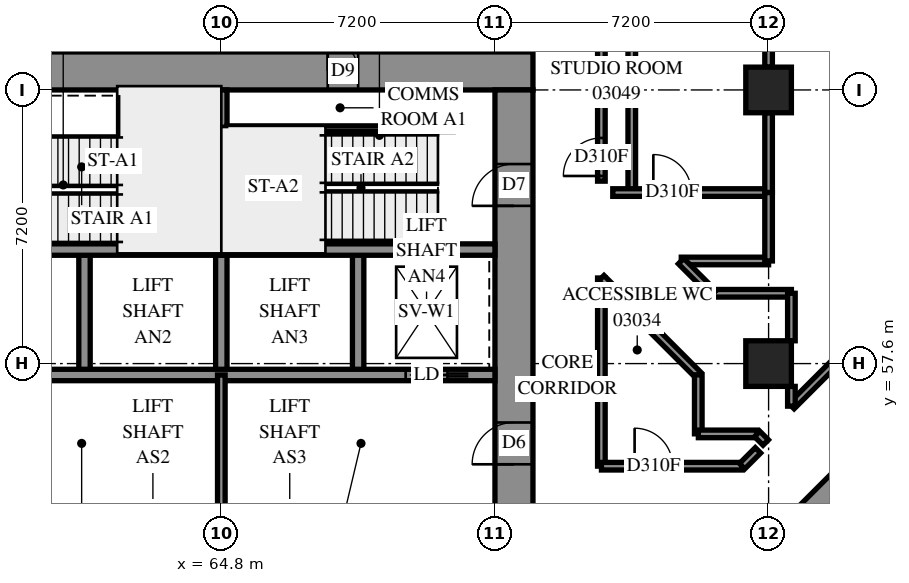
"""IFC4 building model, lengths in metres.
Left out: names, types, materials, properties, quantities, classifications, styles, units other than length and angle.
Written with IfcOpenShell. Run it as: python <this file> out.ifc"""

import sys

from ifc_helpers import new_model, si_unit, direction, frame, frame_2d, origin, origin_2d, place, context, subcontext, project, spatial, polyline, rectangle, outline, extrude, element, fill, save


model = new_model("IFC4")
c1 = context("Model", 3, precision=1e-05, world=origin(), true_north=direction((0.0, 1.0)))
c2 = subcontext(c1, "Body", "Model", "MODEL_VIEW")
j1 = project(units=[si_unit("LENGTHUNIT", "METRE"), si_unit("PLANEANGLEUNIT", "RADIAN")], contexts=[c1])
p1 = place(None, origin())
s1 = spatial("IfcSite", under=j1, at=p1, CompositionType="ELEMENT")
p2 = place(p1, origin())
s2 = spatial("IfcBuilding", under=s1, at=p2, CompositionType="ELEMENT")
p3 = place(p2, frame((0.0, 0.0, 14.4)))
s3 = spatial("IfcBuildingStorey", under=s2, at=p3, CompositionType="ELEMENT", Elevation=14.4)
for number, where, z_axis, x_axis in (
    (1, (79.2, 57.6, 0.0), (0.0, 0.0, 1.0), (1.0, 0.0, 0.0)),
    (2, (79.2, 64.8, 0.0), (0.0, 0.0, 1.0), (1.0, 0.0, 0.0)),
):
    element("IfcColumn", number, at=place(p3, frame(where, z_axis=z_axis, x_axis=x_axis)), inside=s3, PredefinedType="COLUMN", context=c2, shape_type="SweptSolid", body=[
        extrude(rectangle(XDim=1.2, YDim=1.2, at=origin_2d()), origin(), (0.0, 0.0, 1.0), 3.8),
    ])
p4 = place(p3, frame((56.6, 65.3, -0.4), z_axis=(0.0, 0.0, 1.0), x_axis=(1.0, 0.0, 0.0)))
e3 = element("IfcWall", 3, at=p4, inside=s3, PredefinedType="SHEAR", context=c2, shape_type="SweptSolid", body=[
    extrude(rectangle(XDim=16.4, YDim=1.0, at=frame_2d((8.2, 0.0))), origin(), (0.0, 0.0, 1.0), 3.5),
])
p5 = place(p4, frame((11.0, 0.0, 0.4)))
e4 = element("IfcOpeningElement", 4, at=p5, cuts=e3, PredefinedType="OPENING", context=c2, shape_type="SweptSolid", body=[
    extrude(rectangle(XDim=0.8, YDim=2.1, at=frame_2d((0.4, 1.05))), frame((0.0, 0.51, 0.0), z_axis=(0.0, -1.0, 0.0), x_axis=(1.0, 0.0, 0.0)), (0.0, 0.0, 1.0), 1.02),
])
p6 = place(p3, frame((72.5, 50.4, -0.4), z_axis=(0.0, 0.0, 1.0), x_axis=(0.0, 1.0, 0.0)))
e5 = element("IfcWall", 5, at=p6, inside=s3, PredefinedType="SHEAR", context=c2, shape_type="SweptSolid", body=[
    extrude(rectangle(XDim=14.4, YDim=1.0, at=frame_2d((7.2, 0.0))), origin(), (0.0, 0.0, 1.0), 3.5),
])
p7 = place(p6, frame((4.55, 0.0, 0.4)))
e6 = element("IfcOpeningElement", 6, at=p7, cuts=e5, PredefinedType="OPENING", context=c2, shape_type="SweptSolid", body=[
    extrude(rectangle(XDim=1.1, YDim=2.1, at=frame_2d((0.55, 1.05))), frame((0.0, 0.51, 0.0), z_axis=(0.0, -1.0, 0.0), x_axis=(1.0, 0.0, 0.0)), (0.0, 0.0, 1.0), 1.02),
])
p8 = place(p6, frame((11.35, 0.0, 0.4)))
e7 = element("IfcOpeningElement", 7, at=p8, cuts=e5, PredefinedType="OPENING", context=c2, shape_type="SweptSolid", body=[
    extrude(rectangle(XDim=1.1, YDim=2.1, at=frame_2d((0.55, 1.05))), frame((0.0, 0.51, 0.0), z_axis=(0.0, -1.0, 0.0), x_axis=(1.0, 0.0, 0.0)), (0.0, 0.0, 1.0), 1.02),
])
for number, where, z_axis, x_axis in (
    (8, (61.2, 57.3, 0.0), (0.0, 0.0, 1.0), (0.0, 1.0, 0.0)),
    (9, (64.8, 57.3, 0.0), (0.0, 0.0, 1.0), (0.0, 1.0, 0.0)),
    (10, (68.4, 57.3, 0.0), (0.0, 0.0, 1.0), (0.0, 1.0, 0.0)),
):
    element("IfcWall", number, at=place(p3, frame(where, z_axis=z_axis, x_axis=x_axis)), inside=s3, PredefinedType="SOLIDWALL", context=c2, shape_type="SweptSolid", body=[
        extrude(rectangle(XDim=3.3, YDim=0.3, at=frame_2d((1.65, 0.0))), origin(), (0.0, 0.0, 1.0), 3.8),
    ])
p9 = place(p3, frame((57.6, 57.3, 0.0), z_axis=(0.0, 0.0, 1.0), x_axis=(1.0, 0.0, 0.0)))
e11 = element("IfcWall", 11, at=p9, inside=s3, PredefinedType="SOLIDWALL", context=c2, shape_type="SweptSolid", body=[
    extrude(rectangle(XDim=14.4, YDim=0.3, at=frame_2d((7.2, 0.0))), origin(), (0.0, 0.0, 1.0), 3.8),
])
p10 = place(p9, frame((12.05, 0.0, 0.0)))
e12 = element("IfcOpeningElement", 12, at=p10, cuts=e11, PredefinedType="OPENING", context=c2, shape_type="SweptSolid", body=[
    extrude(rectangle(XDim=1.1, YDim=2.1, at=frame_2d((0.55, 1.05))), frame((0.0, 0.16, 0.0), z_axis=(0.0, -1.0, 0.0), x_axis=(1.0, 0.0, 0.0)), (0.0, 0.0, 1.0), 0.32),
])
for number, where, z_axis, x_axis in (
    (13, (57.6, 60.6, 0.0), (0.0, 0.0, 1.0), (1.0, 0.0, 0.0)),
    (14, (64.8, 60.6, 0.0), (0.0, 0.0, 1.0), (1.0, 0.0, 0.0)),
):
    element("IfcWall", number, at=place(p3, frame(where, z_axis=z_axis, x_axis=x_axis)), inside=s3, PredefinedType="SOLIDWALL", context=c2, shape_type="SweptSolid", body=[
        extrude(rectangle(XDim=7.2, YDim=0.3, at=frame_2d((3.6, 0.0))), origin(), (0.0, 0.0, 1.0), 3.8),
    ])
p11 = place(p3, frame((64.8, 60.6, 0.0), z_axis=(0.0, 0.0, 1.0), x_axis=(0.0, 1.0, 0.0)))
e15 = element("IfcWall", 15, at=p11, inside=s3, PredefinedType="SOLIDWALL", context=c2, shape_type="SweptSolid", body=[
    extrude(rectangle(XDim=4.2, YDim=0.3, at=frame_2d((2.1, 0.0))), origin(), (0.0, 0.0, 1.0), 3.8),
])
p12 = place(p3, frame((76.301, 49.443, -0.4), z_axis=(0.0, 0.0, 1.0), x_axis=(0.7071067812, 0.7071067812, 0.0)))
e16 = element("IfcWall", 16, at=p12, inside=s3, PredefinedType="SHEAR", context=c2, shape_type="SweptSolid", body=[
    extrude(rectangle(XDim=14.4, YDim=1.0, at=frame_2d((7.2, 0.0))), origin(), (0.0, 0.0, 1.0), 3.5),
])
p13 = place(p12, frame((4.55, 0.0, 0.4)))
e17 = element("IfcOpeningElement", 17, at=p13, cuts=e16, PredefinedType="OPENING", context=c2, shape_type="SweptSolid", body=[
    extrude(rectangle(XDim=1.1, YDim=2.1, at=frame_2d((0.55, 1.05))), frame((0.0, 0.51, 0.0), z_axis=(0.0, -1.0, 0.0), x_axis=(1.0, 0.0, 0.0)), (0.0, 0.0, 1.0), 1.02),
])
p14 = place(p12, frame((11.35, 0.0, 0.4)))
e18 = element("IfcOpeningElement", 18, at=p14, cuts=e16, PredefinedType="OPENING", context=c2, shape_type="SweptSolid", body=[
    extrude(rectangle(XDim=1.1, YDim=2.1, at=frame_2d((0.55, 1.05))), frame((0.0, 0.51, 0.0), z_axis=(0.0, -1.0, 0.0), x_axis=(1.0, 0.0, 0.0)), (0.0, 0.0, 1.0), 1.02),
])
p15 = place(p3, frame((117.843, 34.665, 0.0), z_axis=(0.0, 0.0, 1.0), x_axis=(-0.7071067812, 0.7071067812, 0.0)))
e19 = element("IfcWall", 19, at=p15, inside=s3, PredefinedType="SOLIDWALL", context=c2, shape_type="SweptSolid", body=[
    extrude(outline(polyline([(-0.275, -0.275), (54.222, -0.275), (53.994, 0.275), (0.275, 0.275), (-0.275, -0.275)])), origin(), (0.0, 0.0, 1.0), 3.8),
])
p16 = place(p15, frame((0.8, 0.0, 0.7)))
e20 = element("IfcOpeningElement", 20, at=p16, cuts=e19, PredefinedType="OPENING", context=c2, shape_type="SweptSolid", body=[
    extrude(rectangle(XDim=1.8, YDim=2.6, at=frame_2d((0.9, 1.3))), frame((0.0, 0.285, 0.0), z_axis=(0.0, -1.0, 0.0), x_axis=(1.0, 0.0, 0.0)), (0.0, 0.0, 1.0), 0.57),
])
p17 = place(p15, frame((4.225, 0.0, 0.7)))
e21 = element("IfcOpeningElement", 21, at=p17, cuts=e19, PredefinedType="OPENING", context=c2, shape_type="SweptSolid", body=[
    extrude(rectangle(XDim=1.8, YDim=2.6, at=frame_2d((0.9, 1.3))), frame((0.0, 0.285, 0.0), z_axis=(0.0, -1.0, 0.0), x_axis=(1.0, 0.0, 0.0)), (0.0, 0.0, 1.0), 0.57),
])
p18 = place(p15, frame((7.825, 0.0, 0.7)))
e22 = element("IfcOpeningElement", 22, at=p18, cuts=e19, PredefinedType="OPENING", context=c2, shape_type="SweptSolid", body=[
    extrude(rectangle(XDim=1.8, YDim=2.6, at=frame_2d((0.9, 1.3))), frame((0.0, 0.285, 0.0), z_axis=(0.0, -1.0, 0.0), x_axis=(1.0, 0.0, 0.0)), (0.0, 0.0, 1.0), 0.57),
])
p19 = place(p15, frame((11.425, 0.0, 0.7)))
e23 = element("IfcOpeningElement", 23, at=p19, cuts=e19, PredefinedType="OPENING", context=c2, shape_type="SweptSolid", body=[
    extrude(rectangle(XDim=1.8, YDim=2.6, at=frame_2d((0.9, 1.3))), frame((0.0, 0.285, 0.0), z_axis=(0.0, -1.0, 0.0), x_axis=(1.0, 0.0, 0.0)), (0.0, 0.0, 1.0), 0.57),
])
p20 = place(p15, frame((15.025, 0.0, 0.7)))
e24 = element("IfcOpeningElement", 24, at=p20, cuts=e19, PredefinedType="OPENING", context=c2, shape_type="SweptSolid", body=[
    extrude(rectangle(XDim=1.8, YDim=2.6, at=frame_2d((0.9, 1.3))), frame((0.0, 0.285, 0.0), z_axis=(0.0, -1.0, 0.0), x_axis=(1.0, 0.0, 0.0)), (0.0, 0.0, 1.0), 0.57),
])
p21 = place(p15, frame((18.625, 0.0, 0.7)))
e25 = element("IfcOpeningElement", 25, at=p21, cuts=e19, PredefinedType="OPENING", context=c2, shape_type="SweptSolid", body=[
    extrude(rectangle(XDim=1.8, YDim=2.6, at=frame_2d((0.9, 1.3))), frame((0.0, 0.285, 0.0), z_axis=(0.0, -1.0, 0.0), x_axis=(1.0, 0.0, 0.0)), (0.0, 0.0, 1.0), 0.57),
])
p22 = place(p15, frame((22.225, 0.0, 0.7)))
e26 = element("IfcOpeningElement", 26, at=p22, cuts=e19, PredefinedType="OPENING", context=c2, shape_type="SweptSolid", body=[
    extrude(rectangle(XDim=1.8, YDim=2.6, at=frame_2d((0.9, 1.3))), frame((0.0, 0.285, 0.0), z_axis=(0.0, -1.0, 0.0), x_axis=(1.0, 0.0, 0.0)), (0.0, 0.0, 1.0), 0.57),
])
p23 = place(p15, frame((25.825, 0.0, 0.7)))
e27 = element("IfcOpeningElement", 27, at=p23, cuts=e19, PredefinedType="OPENING", context=c2, shape_type="SweptSolid", body=[
    extrude(rectangle(XDim=1.8, YDim=2.6, at=frame_2d((0.9, 1.3))), frame((0.0, 0.285, 0.0), z_axis=(0.0, -1.0, 0.0), x_axis=(1.0, 0.0, 0.0)), (0.0, 0.0, 1.0), 0.57),
])
p24 = place(p15, frame((29.425, 0.0, 0.7)))
e28 = element("IfcOpeningElement", 28, at=p24, cuts=e19, PredefinedType="OPENING", context=c2, shape_type="SweptSolid", body=[
    extrude(rectangle(XDim=1.8, YDim=2.6, at=frame_2d((0.9, 1.3))), frame((0.0, 0.285, 0.0), z_axis=(0.0, -1.0, 0.0), x_axis=(1.0, 0.0, 0.0)), (0.0, 0.0, 1.0), 0.57),
])
p25 = place(p15, frame((33.025, 0.0, 0.7)))
e29 = element("IfcOpeningElement", 29, at=p25, cuts=e19, PredefinedType="OPENING", context=c2, shape_type="SweptSolid", body=[
    extrude(rectangle(XDim=1.8, YDim=2.6, at=frame_2d((0.9, 1.3))), frame((0.0, 0.285, 0.0), z_axis=(0.0, -1.0, 0.0), x_axis=(1.0, 0.0, 0.0)), (0.0, 0.0, 1.0), 0.57),
])
p26 = place(p15, frame((36.625, 0.0, 0.7)))
e30 = element("IfcOpeningElement", 30, at=p26, cuts=e19, PredefinedType="OPENING", context=c2, shape_type="SweptSolid", body=[
    extrude(rectangle(XDim=1.8, YDim=2.6, at=frame_2d((0.9, 1.3))), frame((0.0, 0.285, 0.0), z_axis=(0.0, -1.0, 0.0), x_axis=(1.0, 0.0, 0.0)), (0.0, 0.0, 1.0), 0.57),
])
p27 = place(p15, frame((40.225, 0.0, 0.7)))
e31 = element("IfcOpeningElement", 31, at=p27, cuts=e19, PredefinedType="OPENING", context=c2, shape_type="SweptSolid", body=[
    extrude(rectangle(XDim=1.8, YDim=2.6, at=frame_2d((0.9, 1.3))), frame((0.0, 0.285, 0.0), z_axis=(0.0, -1.0, 0.0), x_axis=(1.0, 0.0, 0.0)), (0.0, 0.0, 1.0), 0.57),
])
p28 = place(p15, frame((43.825, 0.0, 0.7)))
e32 = element("IfcOpeningElement", 32, at=p28, cuts=e19, PredefinedType="OPENING", context=c2, shape_type="SweptSolid", body=[
    extrude(rectangle(XDim=1.8, YDim=2.6, at=frame_2d((0.9, 1.3))), frame((0.0, 0.285, 0.0), z_axis=(0.0, -1.0, 0.0), x_axis=(1.0, 0.0, 0.0)), (0.0, 0.0, 1.0), 0.57),
])
p29 = place(p15, frame((47.425, 0.0, 0.7)))
e33 = element("IfcOpeningElement", 33, at=p29, cuts=e19, PredefinedType="OPENING", context=c2, shape_type="SweptSolid", body=[
    extrude(rectangle(XDim=1.8, YDim=2.6, at=frame_2d((0.9, 1.3))), frame((0.0, 0.285, 0.0), z_axis=(0.0, -1.0, 0.0), x_axis=(1.0, 0.0, 0.0)), (0.0, 0.0, 1.0), 0.57),
])
p30 = place(p15, frame((51.06, 0.0, 0.7)))
e34 = element("IfcOpeningElement", 34, at=p30, cuts=e19, PredefinedType="OPENING", context=c2, shape_type="SweptSolid", body=[
    extrude(rectangle(XDim=1.8, YDim=2.6, at=frame_2d((0.9, 1.3))), frame((0.0, 0.285, 0.0), z_axis=(0.0, -1.0, 0.0), x_axis=(1.0, 0.0, 0.0)), (0.0, 0.0, 1.0), 0.57),
])
p31 = place(p3, frame((64.95, 63.78, 0.0), z_axis=(0.0, 0.0, 1.0), x_axis=(1.0, 0.0, 0.0)))
e35 = element("IfcWall", 35, at=p31, inside=s3, PredefinedType="PARTITIONING", context=c2, shape_type="SweptSolid", body=[
    extrude(rectangle(XDim=5.95, YDim=0.15, at=frame_2d((2.975, 0.0))), origin(), (0.0, 0.0, 1.0), 3.8),
])
p32 = place(p3, frame((70.9, 63.78, 0.0), z_axis=(0.0, 0.0, 1.0), x_axis=(0.0, 1.0, 0.0)))
e36 = element("IfcWall", 36, at=p32, inside=s3, PredefinedType="PARTITIONING", context=c2, shape_type="SweptSolid", body=[
    extrude(rectangle(XDim=1.02, YDim=0.15, at=frame_2d((0.51, 0.0))), origin(), (0.0, 0.0, 1.0), 3.8),
])
p33 = place(p3, frame((64.8, 53.7, 0.0), z_axis=(0.0, 0.0, 1.0), x_axis=(0.0, 1.0, 0.0)))
e37 = element("IfcWall", 37, at=p33, inside=s3, PredefinedType="PARTITIONING", context=c2, shape_type="SweptSolid", body=[
    extrude(rectangle(XDim=3.6, YDim=0.2, at=frame_2d((1.8, 0.0))), origin(), (0.0, 0.0, 1.0), 3.8),
])
p34 = place(p3, frame((75.6, 62.1, 0.0), z_axis=(0.0, 0.0, 1.0), x_axis=(0.0, 1.0, 0.0)))
e38 = element("IfcWall", 38, at=p34, inside=s3, PredefinedType="PARTITIONING", context=c2, shape_type="SweptSolid", body=[
    extrude(rectangle(XDim=10.55, YDim=0.2, at=frame_2d((5.275, 0.0))), origin(), (0.0, 0.0, 1.0), 3.8),
])
p35 = place(p3, frame((79.2, 65.4, 0.0), z_axis=(0.0, 0.0, 1.0), x_axis=(0.0, 1.0, 0.0)))
e39 = element("IfcWall", 39, at=p35, inside=s3, PredefinedType="PARTITIONING", context=c2, shape_type="SweptSolid", body=[
    extrude(rectangle(XDim=6.0, YDim=0.2, at=frame_2d((3.0, 0.0))), origin(), (0.0, 0.0, 1.0), 3.8),
])
p36 = place(p3, frame((74.8, 62.4, 0.0), z_axis=(0.0, 0.0, 1.0), x_axis=(0.0, 1.0, 0.0)))
e40 = element("IfcWall", 40, at=p36, inside=s3, PredefinedType="PARTITIONING", context=c2, shape_type="SweptSolid", body=[
    extrude(rectangle(XDim=5.2, YDim=0.2, at=frame_2d((2.6, 0.0))), origin(), (0.0, 0.0, 1.0), 3.8),
])
p37 = place(p36, frame((0.137, 0.0, 0.0)))
e41 = element("IfcOpeningElement", 41, at=p37, cuts=e40, PredefinedType="OPENING", context=c2, shape_type="SweptSolid", body=[
    extrude(rectangle(XDim=1.0, YDim=2.1, at=frame_2d((0.5, 1.05))), frame((0.0, 0.11, 0.0), z_axis=(0.0, -1.0, 0.0), x_axis=(1.0, 0.0, 0.0)), (0.0, 0.0, 1.0), 0.22),
])
p38 = place(p3, frame((74.8, 54.902, 0.0), z_axis=(0.0, 0.0, 1.0), x_axis=(0.0, 1.0, 0.0)))
e42 = element("IfcWall", 42, at=p38, inside=s3, PredefinedType="PARTITIONING", context=c2, shape_type="SweptSolid", body=[
    extrude(rectangle(XDim=4.95, YDim=0.2, at=frame_2d((2.475, 0.0))), origin(), (0.0, 0.0, 1.0), 3.8),
])
p39 = place(p3, frame((75.1, 62.1, 0.0), z_axis=(0.0, 0.0, 1.0), x_axis=(1.0, 0.0, 0.0)))
e43 = element("IfcWall", 43, at=p39, inside=s3, PredefinedType="PARTITIONING", context=c2, shape_type="SweptSolid", body=[
    extrude(rectangle(XDim=4.1, YDim=0.2, at=frame_2d((2.05, 0.0))), origin(), (0.0, 0.0, 1.0), 3.8),
])
p40 = place(p39, frame((1.067, 0.0, 0.0)))
e44 = element("IfcOpeningElement", 44, at=p40, cuts=e43, PredefinedType="OPENING", context=c2, shape_type="SweptSolid", body=[
    extrude(rectangle(XDim=1.0, YDim=2.1, at=frame_2d((0.5, 1.05))), frame((0.0, 0.11, 0.0), z_axis=(0.0, -1.0, 0.0), x_axis=(1.0, 0.0, 0.0)), (0.0, 0.0, 1.0), 0.22),
])
p41 = place(p3, frame((74.802, 54.9, 0.0), z_axis=(0.0, 0.0, 1.0), x_axis=(1.0, 0.0, 0.0)))
e45 = element("IfcWall", 45, at=p41, inside=s3, PredefinedType="PARTITIONING", context=c2, shape_type="SweptSolid", body=[
    extrude(rectangle(XDim=3.702, YDim=0.2, at=frame_2d((1.851, 0.0))), origin(), (0.0, 0.0, 1.0), 3.8),
])
p42 = place(p41, frame((0.873, 0.0, 0.0)))
e46 = element("IfcOpeningElement", 46, at=p42, cuts=e45, PredefinedType="OPENING", context=c2, shape_type="SweptSolid", body=[
    extrude(rectangle(XDim=1.0, YDim=2.1, at=frame_2d((0.5, 1.05))), frame((0.0, 0.11, 0.0), z_axis=(0.0, -1.0, 0.0), x_axis=(1.0, 0.0, 0.0)), (0.0, 0.0, 1.0), 0.22),
])
p43 = place(p3, frame((74.799, 59.849, 0.0), z_axis=(0.0, 0.0, 1.0), x_axis=(0.7071067812, -0.7071067812, 0.0)))
e47 = element("IfcWall", 47, at=p43, inside=s3, PredefinedType="PARTITIONING", context=c2, shape_type="SweptSolid", body=[
    extrude(rectangle(XDim=3.603, YDim=0.2, at=frame_2d((1.802, 0.0))), origin(), (0.0, 0.0, 1.0), 3.8),
])
p44 = place(p3, frame((76.902, 60.3, 0.0), z_axis=(0.0, 0.0, 1.0), x_axis=(1.0, 0.0, 0.0)))
e48 = element("IfcWall", 48, at=p44, inside=s3, PredefinedType="PARTITIONING", context=c2, shape_type="SweptSolid", body=[
    extrude(rectangle(XDim=2.298, YDim=0.2, at=frame_2d((1.149, 0.0))), origin(), (0.0, 0.0, 1.0), 3.8),
])
p45 = place(p3, frame((79.2, 62.1, 0.0), z_axis=(0.0, 0.0, 1.0), x_axis=(0.0, 1.0, 0.0)))
e49 = element("IfcWall", 49, at=p45, inside=s3, PredefinedType="PARTITIONING", context=c2, shape_type="SweptSolid", body=[
    extrude(rectangle(XDim=2.1, YDim=0.2, at=frame_2d((1.05, 0.0))), origin(), (0.0, 0.0, 1.0), 3.8),
])
p46 = place(p3, frame((77.75, 59.45, 0.0), z_axis=(0.0, 0.0, 1.0), x_axis=(1.0, 0.0, 0.0)))
e50 = element("IfcWall", 50, at=p46, inside=s3, PredefinedType="PARTITIONING", context=c2, shape_type="SweptSolid", body=[
    extrude(rectangle(XDim=2.05, YDim=0.2, at=frame_2d((1.025, 0.0))), origin(), (0.0, 0.0, 1.0), 3.8),
])
p47 = place(p3, frame((79.2, 60.3, 0.0), z_axis=(0.0, 0.0, 1.0), x_axis=(0.0, 1.0, 0.0)))
e51 = element("IfcWall", 51, at=p47, inside=s3, PredefinedType="PARTITIONING", context=c2, shape_type="SweptSolid", body=[
    extrude(rectangle(XDim=1.8, YDim=0.2, at=frame_2d((0.9, 0.0))), origin(), (0.0, 0.0, 1.0), 3.8),
])
p48 = place(p3, frame((79.801, 56.481, 0.0), z_axis=(0.0, 0.0, 1.0), x_axis=(0.7071067812, 0.7071067812, 0.0)))
e52 = element("IfcWall", 52, at=p48, inside=s3, PredefinedType="PARTITIONING", context=c2, shape_type="SweptSolid", body=[
    extrude(rectangle(XDim=1.765, YDim=0.2, at=frame_2d((0.882, 0.0))), origin(), (0.0, 0.0, 1.0), 3.8),
])
for number, where, z_axis, x_axis in (
    (53, (77.35, 55.752, 0.0), (0.0, 0.0, 1.0), (0.0, 1.0, 0.0)),
    (54, (77.352, 55.75, 0.0), (0.0, 0.0, 1.0), (1.0, 0.0, 0.0)),
):
    element("IfcWall", number, at=place(p3, frame(where, z_axis=z_axis, x_axis=x_axis)), inside=s3, PredefinedType="PARTITIONING", context=c2, shape_type="SweptSolid", body=[
        extrude(rectangle(XDim=1.552, YDim=0.2, at=frame_2d((0.776, 0.0))), origin(), (0.0, 0.0, 1.0), 3.8),
    ])
p49 = place(p3, frame((79.8, 58.2, 0.0), z_axis=(0.0, 0.0, 1.0), x_axis=(0.0, 1.0, 0.0)))
e55 = element("IfcWall", 55, at=p49, inside=s3, PredefinedType="PARTITIONING", context=c2, shape_type="SweptSolid", body=[
    extrude(rectangle(XDim=1.25, YDim=0.2, at=frame_2d((0.625, 0.0))), origin(), (0.0, 0.0, 1.0), 3.8),
])
p50 = place(p3, frame((76.897, 60.295, 0.0), z_axis=(0.0, 0.0, 1.0), x_axis=(0.7071067812, -0.7071067812, 0.0)))
e56 = element("IfcWall", 56, at=p50, inside=s3, PredefinedType="PARTITIONING", context=c2, shape_type="SweptSolid", body=[
    extrude(rectangle(XDim=1.199, YDim=0.2, at=frame_2d((0.6, 0.0))), origin(), (0.0, 0.0, 1.0), 3.8),
])
p51 = place(p3, frame((78.505, 54.901, 0.0), z_axis=(0.0, 0.0, 1.0), x_axis=(0.7071067812, 0.7071067812, 0.0)))
e57 = element("IfcWall", 57, at=p51, inside=s3, PredefinedType="PARTITIONING", context=c2, shape_type="SweptSolid", body=[
    extrude(rectangle(XDim=0.588, YDim=0.2, at=frame_2d((0.294, 0.0))), origin(), (0.0, 0.0, 1.0), 3.8),
])
p52 = place(p3, frame((79.8, 56.48, 0.0), z_axis=(0.0, 0.0, 1.0), x_axis=(0.0, 1.0, 0.0)))
e58 = element("IfcWall", 58, at=p52, inside=s3, PredefinedType="PARTITIONING", context=c2, shape_type="SweptSolid", body=[
    extrude(rectangle(XDim=0.52, YDim=0.2, at=frame_2d((0.26, 0.0))), origin(), (0.0, 0.0, 1.0), 3.8),
])
p53 = place(p3, frame((78.901, 55.747, 0.0), z_axis=(0.0, 0.0, 1.0), x_axis=(0.7071067812, -0.7071067812, 0.0)))
e59 = element("IfcWall", 59, at=p53, inside=s3, PredefinedType="PARTITIONING", context=c2, shape_type="SweptSolid", body=[
    extrude(rectangle(XDim=0.317, YDim=0.2, at=frame_2d((0.158, 0.0))), origin(), (0.0, 0.0, 1.0), 3.8),
])
p54 = place(p5, origin())
e60 = element("IfcDoor", 60, at=p54, inside=s3, OperationType="SINGLE_SWING_RIGHT", PredefinedType="DOOR", context=c2, shape_type="SweptSolid", body=[
    extrude(rectangle(XDim=0.8, YDim=2.1, at=frame_2d((0.4, 1.05))), frame((0.0, -0.44, 0.0), z_axis=(0.0, -1.0, 0.0), x_axis=(1.0, 0.0, 0.0)), (0.0, 0.0, 1.0), 0.05),
])
fill(e4, e60)
p55 = place(p7, origin())
e61 = element("IfcDoor", 61, at=p55, inside=s3, OperationType="DOUBLE_DOOR_SINGLE_SWING", PredefinedType="DOOR", context=c2, shape_type="SweptSolid", body=[
    extrude(rectangle(XDim=1.1, YDim=2.1, at=frame_2d((0.55, 1.05))), frame((0.0, 0.025, 0.0), z_axis=(0.0, -1.0, 0.0), x_axis=(1.0, 0.0, 0.0)), (0.0, 0.0, 1.0), 0.05),
])
fill(e6, e61)
p56 = place(p8, origin())
e62 = element("IfcDoor", 62, at=p56, inside=s3, OperationType="SINGLE_SWING_RIGHT", PredefinedType="DOOR", context=c2, shape_type="SweptSolid", body=[
    extrude(rectangle(XDim=1.1, YDim=2.1, at=frame_2d((0.55, 1.05))), frame((0.0, 0.025, 0.0), z_axis=(0.0, -1.0, 0.0), x_axis=(1.0, 0.0, 0.0)), (0.0, 0.0, 1.0), 0.05),
])
fill(e7, e62)
p57 = place(p10, origin())
e63 = element("IfcDoor", 63, at=p57, inside=s3, OperationType="SLIDING_TO_RIGHT", PredefinedType="DOOR", context=c2, shape_type="SweptSolid", body=[
    extrude(rectangle(XDim=1.1, YDim=2.1, at=frame_2d((0.55, 1.05))), frame((0.0, 0.025, 0.0), z_axis=(0.0, -1.0, 0.0), x_axis=(1.0, 0.0, 0.0)), (0.0, 0.0, 1.0), 0.05),
])
fill(e12, e63)
p58 = place(p42, origin())
e64 = element("IfcDoor", 64, at=p58, inside=s3, OperationType="SINGLE_SWING_LEFT", PredefinedType="DOOR", context=c2, shape_type="SweptSolid", body=[
    extrude(rectangle(XDim=1.0, YDim=2.1, at=frame_2d((0.5, 1.05))), frame((0.0, 0.025, 0.0), z_axis=(0.0, -1.0, 0.0), x_axis=(1.0, 0.0, 0.0)), (0.0, 0.0, 1.0), 0.05),
])
fill(e46, e64)
p59 = place(p37, origin())
e65 = element("IfcDoor", 65, at=p59, inside=s3, OperationType="SINGLE_SWING_RIGHT", PredefinedType="DOOR", context=c2, shape_type="SweptSolid", body=[
    extrude(rectangle(XDim=1.0, YDim=2.1, at=frame_2d((0.5, 1.05))), frame((0.0, 0.025, 0.0), z_axis=(0.0, -1.0, 0.0), x_axis=(1.0, 0.0, 0.0)), (0.0, 0.0, 1.0), 0.05),
])
fill(e41, e65)
p60 = place(p40, origin())
e66 = element("IfcDoor", 66, at=p60, inside=s3, OperationType="SINGLE_SWING_LEFT", PredefinedType="DOOR", context=c2, shape_type="SweptSolid", body=[
    extrude(rectangle(XDim=1.0, YDim=2.1, at=frame_2d((0.5, 1.05))), frame((0.0, 0.025, 0.0), z_axis=(0.0, -1.0, 0.0), x_axis=(1.0, 0.0, 0.0)), (0.0, 0.0, 1.0), 0.05),
])
fill(e44, e66)
save(model, sys.argv[1])
